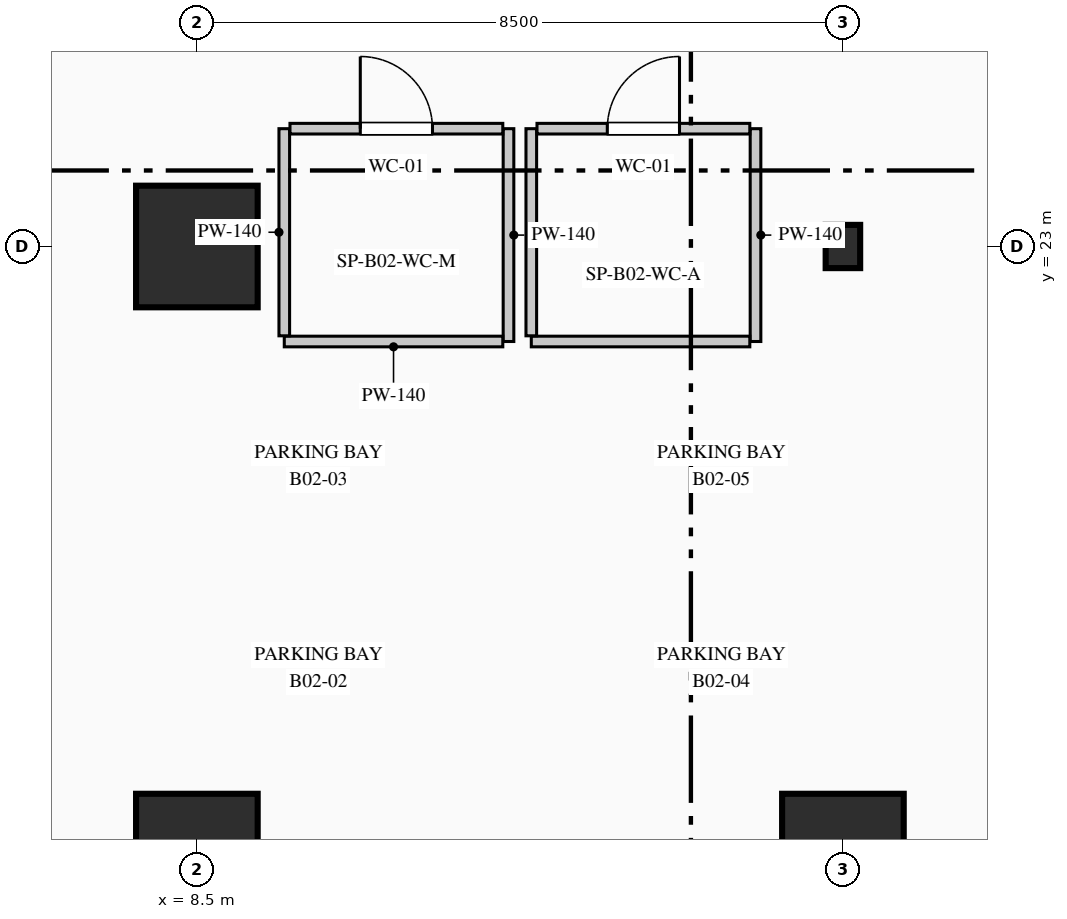
"""IFC4 building model, lengths in metres.
Left out: names, types, materials, properties, quantities, classifications, styles, units other than length and angle.
Written with IfcOpenShell. Run it as: python <this file> out.ifc"""

import sys

from ifc_helpers import new_model, si_unit, direction, frame, frame_2d, origin, origin_2d, place, context, subcontext, project, spatial, rectangle, i_section, extrude, element, fill, save


model = new_model("IFC4")
c1 = context("Model", 3, precision=1e-05, world=origin(), true_north=direction((0.0, 1.0)))
c2 = subcontext(c1, "Body", "Model", "MODEL_VIEW")
j1 = project(units=[si_unit("LENGTHUNIT", "METRE"), si_unit("PLANEANGLEUNIT", "RADIAN")], contexts=[c1])
p1 = place(None, origin())
s1 = spatial("IfcSite", under=j1, at=p1, CompositionType="ELEMENT")
p2 = place(p1, origin())
s2 = spatial("IfcBuilding", under=s1, at=p2, CompositionType="ELEMENT")
p3 = place(p2, frame((0.0, 0.0, -9.0)))
s3 = spatial("IfcBuildingStorey", under=s2, at=p3, CompositionType="ELEMENT", Elevation=-9.0)
for number, where, z_axis, x_axis in (
    (1, (8.5, 15.0, 0.0), (0.0, 0.0, 1.0), (1.0, 0.0, 0.0)),
    (2, (8.5, 23.0, 0.0), (0.0, 0.0, 1.0), (1.0, 0.0, 0.0)),
    (3, (17.0, 15.0, 0.0), (0.0, 0.0, 1.0), (1.0, 0.0, 0.0)),
):
    element("IfcColumn", number, at=place(p3, frame(where, z_axis=z_axis, x_axis=x_axis)), inside=s3, PredefinedType="COLUMN", context=c2, shape_type="SweptSolid", body=[
        extrude(rectangle(XDim=1.6, YDim=1.6, at=origin_2d()), origin(), (0.0, 0.0, 1.0), 4.5),
    ])
p4 = place(p3, frame((17.0, 23.0, 0.0), z_axis=(0.0, 0.0, 1.0), x_axis=(1.0, 0.0, 0.0)))
e4 = element("IfcColumn", 4, at=p4, inside=s3, PredefinedType="COLUMN", context=c2, shape_type="SweptSolid", body=[
    extrude(i_section(OverallWidth=0.454, OverallDepth=0.569, WebThickness=0.078, FlangeThickness=0.08, FilletRadius=0.015, at=origin_2d()), origin(), (0.0, 0.0, 1.0), 4.5),
])
p5 = place(p3, frame((12.6, 24.55, 0.0), z_axis=(0.0, 0.0, 1.0), x_axis=(0.0, -1.0, 0.0)))
e5 = element("IfcWall", 5, at=p5, inside=s3, PredefinedType="PARTITIONING", context=c2, shape_type="SweptSolid", body=[
    extrude(rectangle(XDim=2.8, YDim=0.14, at=frame_2d((1.4, 0.0))), origin(), (0.0, 0.0, 1.0), 3.535),
])
p6 = place(p3, frame((12.525, 21.75, 0.0), z_axis=(0.0, 0.0, 1.0), x_axis=(-1.0, 0.0, 0.0)))
e6 = element("IfcWall", 6, at=p6, inside=s3, PredefinedType="PARTITIONING", context=c2, shape_type="SweptSolid", body=[
    extrude(rectangle(XDim=2.875, YDim=0.14, at=frame_2d((1.438, 0.0))), origin(), (0.0, 0.0, 1.0), 4.15),
])
p7 = place(p3, frame((9.65, 21.825, 0.0), z_axis=(0.0, 0.0, 1.0), x_axis=(0.0, 1.0, 0.0)))
e7 = element("IfcWall", 7, at=p7, inside=s3, PredefinedType="PARTITIONING", context=c2, shape_type="SweptSolid", body=[
    extrude(rectangle(XDim=2.725, YDim=0.14, at=frame_2d((1.363, 0.0))), origin(), (0.0, 0.0, 1.0), 3.535),
])
p8 = place(p3, frame((9.725, 24.55, 0.0), z_axis=(0.0, 0.0, 1.0), x_axis=(1.0, 0.0, 0.0)))
e8 = element("IfcWall", 8, at=p8, inside=s3, PredefinedType="PARTITIONING", context=c2, shape_type="SweptSolid", body=[
    extrude(rectangle(XDim=2.8, YDim=0.14, at=frame_2d((1.4, 0.0))), origin(), (0.0, 0.0, 1.0), 4.15),
])
p9 = place(p8, frame((0.925, 0.0, 0.0)))
e9 = element("IfcOpeningElement", 9, at=p9, cuts=e8, PredefinedType="OPENING", context=c2, shape_type="SweptSolid", body=[
    extrude(rectangle(XDim=0.95, YDim=2.15, at=frame_2d((0.475, 1.075))), frame((0.0, 0.08, 0.0), z_axis=(0.0, -1.0, 0.0), x_axis=(1.0, 0.0, 0.0)), (0.0, 0.0, 1.0), 0.16),
])
p10 = place(p3, frame((15.85, 24.55, 0.0), z_axis=(0.0, 0.0, 1.0), x_axis=(0.0, -1.0, 0.0)))
e10 = element("IfcWall", 10, at=p10, inside=s3, PredefinedType="PARTITIONING", context=c2, shape_type="SweptSolid", body=[
    extrude(rectangle(XDim=2.8, YDim=0.14, at=frame_2d((1.4, 0.0))), origin(), (0.0, 0.0, 1.0), 3.535),
])
p11 = place(p3, frame((15.775, 21.75, 0.0), z_axis=(0.0, 0.0, 1.0), x_axis=(-1.0, 0.0, 0.0)))
e11 = element("IfcWall", 11, at=p11, inside=s3, PredefinedType="PARTITIONING", context=c2, shape_type="SweptSolid", body=[
    extrude(rectangle(XDim=2.875, YDim=0.14, at=frame_2d((1.438, 0.0))), origin(), (0.0, 0.0, 1.0), 4.15),
])
p12 = place(p3, frame((12.9, 21.825, 0.0), z_axis=(0.0, 0.0, 1.0), x_axis=(0.0, 1.0, 0.0)))
e12 = element("IfcWall", 12, at=p12, inside=s3, PredefinedType="PARTITIONING", context=c2, shape_type="SweptSolid", body=[
    extrude(rectangle(XDim=2.725, YDim=0.14, at=frame_2d((1.363, 0.0))), origin(), (0.0, 0.0, 1.0), 3.535),
])
p13 = place(p3, frame((12.975, 24.55, 0.0), z_axis=(0.0, 0.0, 1.0), x_axis=(1.0, 0.0, 0.0)))
e13 = element("IfcWall", 13, at=p13, inside=s3, PredefinedType="PARTITIONING", context=c2, shape_type="SweptSolid", body=[
    extrude(rectangle(XDim=2.8, YDim=0.14, at=frame_2d((1.4, 0.0))), origin(), (0.0, 0.0, 1.0), 4.15),
])
p14 = place(p13, frame((0.925, 0.0, 0.0)))
e14 = element("IfcOpeningElement", 14, at=p14, cuts=e13, PredefinedType="OPENING", context=c2, shape_type="SweptSolid", body=[
    extrude(rectangle(XDim=0.95, YDim=2.15, at=frame_2d((0.475, 1.075))), frame((0.0, 0.08, 0.0), z_axis=(0.0, -1.0, 0.0), x_axis=(1.0, 0.0, 0.0)), (0.0, 0.0, 1.0), 0.16),
])
p15 = place(p9, origin())
e15 = element("IfcDoor", 15, at=p15, inside=s3, OperationType="SINGLE_SWING_LEFT", PredefinedType="DOOR", context=c2, shape_type="SweptSolid", body=[
    extrude(rectangle(XDim=0.95, YDim=2.15, at=frame_2d((0.475, 1.075))), frame((0.0, 0.025, 0.0), z_axis=(0.0, -1.0, 0.0), x_axis=(1.0, 0.0, 0.0)), (0.0, 0.0, 1.0), 0.05),
])
fill(e9, e15)
p16 = place(p14, origin())
e16 = element("IfcDoor", 16, at=p16, inside=s3, OperationType="SINGLE_SWING_RIGHT", PredefinedType="DOOR", context=c2, shape_type="SweptSolid", body=[
    extrude(rectangle(XDim=0.95, YDim=2.15, at=frame_2d((0.475, 1.075))), frame((0.0, 0.025, 0.0), z_axis=(0.0, -1.0, 0.0), x_axis=(1.0, 0.0, 0.0)), (0.0, 0.0, 1.0), 0.05),
])
fill(e14, e16)
save(model, sys.argv[1])
